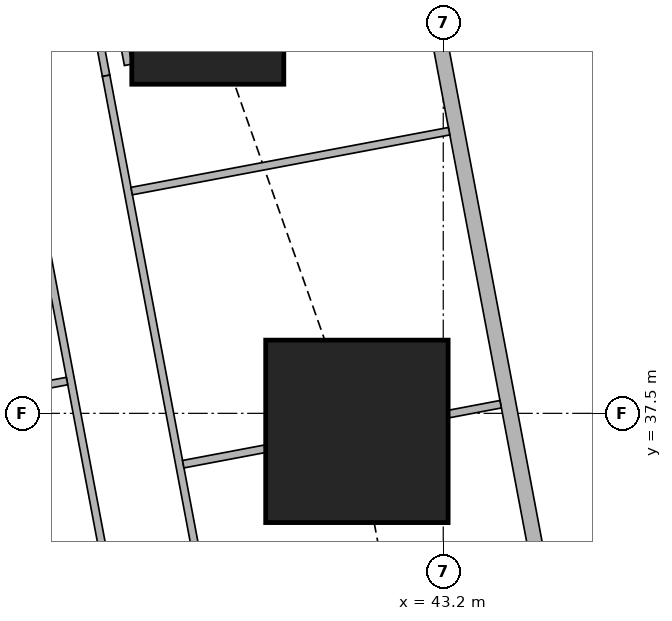
"""IFC4 building model, lengths in metres.
Left out: names, types, materials, properties, quantities, classifications, styles, units other than length and angle.
Written with IfcOpenShell. Run it as: python <this file> out.ifc"""

import sys

from ifc_helpers import new_model, si_unit, direction, frame, frame_2d, origin, origin_2d, place, context, subcontext, project, spatial, rectangle, extrude, element, fill, save


model = new_model("IFC4")
c1 = context("Model", 3, precision=1e-05, world=origin(), true_north=direction((0.0, 1.0)))
c2 = subcontext(c1, "Body", "Model", "MODEL_VIEW")
j1 = project(units=[si_unit("LENGTHUNIT", "METRE"), si_unit("PLANEANGLEUNIT", "RADIAN")], contexts=[c1])
p1 = place(None, origin())
s1 = spatial("IfcSite", under=j1, at=p1, CompositionType="ELEMENT")
p2 = place(p1, origin())
s2 = spatial("IfcBuilding", under=s1, at=p2, CompositionType="ELEMENT")
p3 = place(p2, frame((0.0, 0.0, 223.7)))
s3 = spatial("IfcBuildingStorey", under=s2, at=p3, CompositionType="ELEMENT", Elevation=223.7)
p4 = place(p3, frame((42.064, 37.263, 0.0), z_axis=(0.0, 0.0, 1.0), x_axis=(1.0, 0.0, 0.0)))
e1 = element("IfcColumn", 1, at=p4, inside=s3, PredefinedType="COLUMN", context=c2, shape_type="SweptSolid", body=[
    extrude(rectangle(XDim=2.4, YDim=2.4, at=origin_2d()), origin(), (0.0, 0.0, 1.0), 3.75),
])
p5 = place(p3, frame((40.102, 42.83, 0.0), z_axis=(0.0, 0.0, 1.0), x_axis=(1.0, 0.0, 0.0)))
e2 = element("IfcColumn", 2, at=p5, inside=s3, PredefinedType="COLUMN", context=c2, shape_type="SweptSolid", body=[
    extrude(rectangle(XDim=2.0, YDim=2.0, at=origin_2d()), origin(), (0.0, 0.0, 1.0), 3.75),
])
p6 = place(p3, frame((50.653, 2.703, 0.0), z_axis=(0.0, 0.0, 1.0), x_axis=(-0.185612026696, 0.982623109613, 0.0)))
e3 = element("IfcWall", 3, at=p6, inside=s3, PredefinedType="SOLIDWALL", context=c2, shape_type="SweptSolid", body=[
    extrude(rectangle(XDim=41.393, YDim=0.2, at=frame_2d((20.697, 0.0))), origin(), (0.0, 0.0, 1.0), 3.5),
])
p7 = place(p6, frame((1.633, 0.0, 0.9)))
e4 = element("IfcOpeningElement", 4, at=p7, cuts=e3, PredefinedType="OPENING", context=c2, shape_type="SweptSolid", body=[
    extrude(rectangle(XDim=1.8, YDim=1.5, at=frame_2d((0.9, 0.75))), frame((0.0, 0.11, 0.0), z_axis=(0.0, -1.0, 0.0), x_axis=(1.0, 0.0, 0.0)), (0.0, 0.0, 1.0), 0.22),
])
p8 = place(p6, frame((6.032, 0.0, 0.9)))
e5 = element("IfcOpeningElement", 5, at=p8, cuts=e3, PredefinedType="OPENING", context=c2, shape_type="SweptSolid", body=[
    extrude(rectangle(XDim=1.8, YDim=1.5, at=frame_2d((0.9, 0.75))), frame((0.0, 0.11, 0.0), z_axis=(0.0, -1.0, 0.0), x_axis=(1.0, 0.0, 0.0)), (0.0, 0.0, 1.0), 0.22),
])
p9 = place(p6, frame((9.848, 0.0, 0.9)))
e6 = element("IfcOpeningElement", 6, at=p9, cuts=e3, PredefinedType="OPENING", context=c2, shape_type="SweptSolid", body=[
    extrude(rectangle(XDim=1.8, YDim=1.5, at=frame_2d((0.9, 0.75))), frame((0.0, 0.11, 0.0), z_axis=(0.0, -1.0, 0.0), x_axis=(1.0, 0.0, 0.0)), (0.0, 0.0, 1.0), 0.22),
])
p10 = place(p6, frame((13.664, 0.0, 0.9)))
e7 = element("IfcOpeningElement", 7, at=p10, cuts=e3, PredefinedType="OPENING", context=c2, shape_type="SweptSolid", body=[
    extrude(rectangle(XDim=1.8, YDim=1.5, at=frame_2d((0.9, 0.75))), frame((0.0, 0.11, 0.0), z_axis=(0.0, -1.0, 0.0), x_axis=(1.0, 0.0, 0.0)), (0.0, 0.0, 1.0), 0.22),
])
p11 = place(p6, frame((17.481, 0.0, 0.9)))
e8 = element("IfcOpeningElement", 8, at=p11, cuts=e3, PredefinedType="OPENING", context=c2, shape_type="SweptSolid", body=[
    extrude(rectangle(XDim=1.8, YDim=1.5, at=frame_2d((0.9, 0.75))), frame((0.0, 0.11, 0.0), z_axis=(0.0, -1.0, 0.0), x_axis=(1.0, 0.0, 0.0)), (0.0, 0.0, 1.0), 0.22),
])
p12 = place(p6, frame((21.297, 0.0, 0.9)))
e9 = element("IfcOpeningElement", 9, at=p12, cuts=e3, PredefinedType="OPENING", context=c2, shape_type="SweptSolid", body=[
    extrude(rectangle(XDim=1.8, YDim=1.5, at=frame_2d((0.9, 0.75))), frame((0.0, 0.11, 0.0), z_axis=(0.0, -1.0, 0.0), x_axis=(1.0, 0.0, 0.0)), (0.0, 0.0, 1.0), 0.22),
])
p13 = place(p6, frame((25.113, 0.0, 0.9)))
e10 = element("IfcOpeningElement", 10, at=p13, cuts=e3, PredefinedType="OPENING", context=c2, shape_type="SweptSolid", body=[
    extrude(rectangle(XDim=1.8, YDim=1.5, at=frame_2d((0.9, 0.75))), frame((0.0, 0.11, 0.0), z_axis=(0.0, -1.0, 0.0), x_axis=(1.0, 0.0, 0.0)), (0.0, 0.0, 1.0), 0.22),
])
p14 = place(p6, frame((28.93, 0.0, 0.9)))
e11 = element("IfcOpeningElement", 11, at=p14, cuts=e3, PredefinedType="OPENING", context=c2, shape_type="SweptSolid", body=[
    extrude(rectangle(XDim=1.8, YDim=1.5, at=frame_2d((0.9, 0.75))), frame((0.0, 0.11, 0.0), z_axis=(0.0, -1.0, 0.0), x_axis=(1.0, 0.0, 0.0)), (0.0, 0.0, 1.0), 0.22),
])
p15 = place(p6, frame((32.746, 0.0, 0.9)))
e12 = element("IfcOpeningElement", 12, at=p15, cuts=e3, PredefinedType="OPENING", context=c2, shape_type="SweptSolid", body=[
    extrude(rectangle(XDim=1.8, YDim=1.5, at=frame_2d((0.9, 0.75))), frame((0.0, 0.11, 0.0), z_axis=(0.0, -1.0, 0.0), x_axis=(1.0, 0.0, 0.0)), (0.0, 0.0, 1.0), 0.22),
])
p16 = place(p6, frame((36.481, 0.0, 0.9)))
e13 = element("IfcOpeningElement", 13, at=p16, cuts=e3, PredefinedType="OPENING", context=c2, shape_type="SweptSolid", body=[
    extrude(rectangle(XDim=1.8, YDim=1.5, at=frame_2d((0.9, 0.75))), frame((0.0, 0.11, 0.0), z_axis=(0.0, -1.0, 0.0), x_axis=(1.0, 0.0, 0.0)), (0.0, 0.0, 1.0), 0.22),
])
p17 = place(p3, frame((33.68, 42.723, 0.0), z_axis=(0.0, 0.0, 1.0), x_axis=(0.185601160014, -0.982625162207, 0.0)))
e14 = element("IfcWall", 14, at=p17, inside=s3, PredefinedType="SOLIDWALL", context=c2, shape_type="SweptSolid", body=[
    extrude(rectangle(XDim=41.051, YDim=0.15, at=frame_2d((20.526, 0.0))), origin(), (0.0, 0.0, 1.0), 2.5),
])
p18 = place(p17, frame((16.123, 0.0, 0.0)))
e15 = element("IfcOpeningElement", 15, at=p18, cuts=e14, PredefinedType="OPENING", context=c2, shape_type="SweptSolid", body=[
    extrude(rectangle(XDim=1.0, YDim=2.1, at=frame_2d((0.5, 1.05))), frame((0.0, 0.085, 0.0), z_axis=(0.0, -1.0, 0.0), x_axis=(1.0, 0.0, 0.0)), (0.0, 0.0, 1.0), 0.17),
])
p19 = place(p17, frame((19.938, 0.0, 0.0)))
e16 = element("IfcOpeningElement", 16, at=p19, cuts=e14, PredefinedType="OPENING", context=c2, shape_type="SweptSolid", body=[
    extrude(rectangle(XDim=1.0, YDim=2.1, at=frame_2d((0.5, 1.05))), frame((0.0, 0.085, 0.0), z_axis=(0.0, -1.0, 0.0), x_axis=(1.0, 0.0, 0.0)), (0.0, 0.0, 1.0), 0.17),
])
p20 = place(p17, frame((30.902, 0.0, 0.0)))
e17 = element("IfcOpeningElement", 17, at=p20, cuts=e14, PredefinedType="OPENING", context=c2, shape_type="SweptSolid", body=[
    extrude(rectangle(XDim=1.0, YDim=2.1, at=frame_2d((0.5, 1.05))), frame((0.0, 0.085, 0.0), z_axis=(0.0, -1.0, 0.0), x_axis=(1.0, 0.0, 0.0)), (0.0, 0.0, 1.0), 0.17),
])
p21 = place(p3, frame((39.054, 42.085, 0.0), z_axis=(0.0, 0.0, 1.0), x_axis=(-0.185791584218, 0.982589175207, 0.0)))
e18 = element("IfcWall", 18, at=p21, inside=s3, PredefinedType="PARTITIONING", context=c2, shape_type="SweptSolid", body=[
    extrude(rectangle(XDim=3.628, YDim=0.1, at=frame_2d((1.814, 0.0))), origin(), (0.0, 0.0, 1.0), 2.05),
])
p22 = place(p3, frame((38.256, 44.628, 0.0), z_axis=(0.0, 0.0, 1.0), x_axis=(0.185700639943, -0.982606366927, 0.0)))
e19 = element("IfcWall", 19, at=p22, inside=s3, PredefinedType="PARTITIONING", context=c2, shape_type="SweptSolid", body=[
    extrude(rectangle(XDim=2.735, YDim=0.1, at=frame_2d((1.367, 0.0))), origin(), (0.0, 0.0, 1.0), 2.05),
])
p23 = place(p3, frame((38.764, 41.941, 0.0), z_axis=(0.0, 0.0, 1.0), x_axis=(0.185512176227, -0.982641965556, 0.0)))
e20 = element("IfcWall", 20, at=p23, inside=s3, PredefinedType="PARTITIONING", context=c2, shape_type="SweptSolid", body=[
    extrude(rectangle(XDim=12.792, YDim=0.1, at=frame_2d((6.396, 0.0))), origin(), (0.0, 0.0, 1.0), 2.5),
])
p24 = place(p23, frame((11.35, 0.0, 0.0)))
e21 = element("IfcOpeningElement", 21, at=p24, cuts=e20, PredefinedType="OPENING", context=c2, shape_type="SweptSolid", body=[
    extrude(rectangle(XDim=0.9, YDim=2.1, at=frame_2d((0.45, 1.05))), frame((0.0, 0.06, 0.0), z_axis=(0.0, -1.0, 0.0), x_axis=(1.0, 0.0, 0.0)), (0.0, 0.0, 1.0), 0.12),
])
p25 = place(p23, frame((8.085, 0.0, 0.0)))
e22 = element("IfcOpeningElement", 22, at=p25, cuts=e20, PredefinedType="OPENING", context=c2, shape_type="SweptSolid", body=[
    extrude(rectangle(XDim=0.9, YDim=2.1, at=frame_2d((0.45, 1.05))), frame((0.0, 0.06, 0.0), z_axis=(0.0, -1.0, 0.0), x_axis=(1.0, 0.0, 0.0)), (0.0, 0.0, 1.0), 0.12),
])
p26 = place(p23, frame((3.7, 0.0, 0.0)))
e23 = element("IfcOpeningElement", 23, at=p26, cuts=e20, PredefinedType="OPENING", context=c2, shape_type="SweptSolid", body=[
    extrude(rectangle(XDim=0.9, YDim=2.1, at=frame_2d((0.45, 1.05))), frame((0.0, 0.06, 0.0), z_axis=(0.0, -1.0, 0.0), x_axis=(1.0, 0.0, 0.0)), (0.0, 0.0, 1.0), 0.12),
])
p27 = place(p3, frame((37.473, 42.309, 0.0), z_axis=(0.0, 0.0, 1.0), x_axis=(0.185570636839, -0.982630927024, 0.0)))
e24 = element("IfcWall", 24, at=p27, inside=s3, PredefinedType="PARTITIONING", context=c2, shape_type="SweptSolid", body=[
    extrude(rectangle(XDim=13.553, YDim=0.1, at=frame_2d((6.777, 0.0))), origin(), (0.0, 0.0, 1.0), 2.5),
])
p28 = place(p27, frame((12.128, 0.0, 0.0)))
e25 = element("IfcOpeningElement", 25, at=p28, cuts=e24, PredefinedType="OPENING", context=c2, shape_type="SweptSolid", body=[
    extrude(rectangle(XDim=0.9, YDim=2.1, at=frame_2d((0.45, 1.05))), frame((0.0, 0.06, 0.0), z_axis=(0.0, -1.0, 0.0), x_axis=(1.0, 0.0, 0.0)), (0.0, 0.0, 1.0), 0.12),
])
p29 = place(p27, frame((8.487, 0.0, 0.0)))
e26 = element("IfcOpeningElement", 26, at=p29, cuts=e24, PredefinedType="OPENING", context=c2, shape_type="SweptSolid", body=[
    extrude(rectangle(XDim=0.9, YDim=2.1, at=frame_2d((0.45, 1.05))), frame((0.0, 0.06, 0.0), z_axis=(0.0, -1.0, 0.0), x_axis=(1.0, 0.0, 0.0)), (0.0, 0.0, 1.0), 0.12),
])
p30 = place(p27, frame((2.853, 0.0, 0.0)))
e27 = element("IfcOpeningElement", 27, at=p30, cuts=e24, PredefinedType="OPENING", context=c2, shape_type="SweptSolid", body=[
    extrude(rectangle(XDim=0.9, YDim=2.1, at=frame_2d((0.45, 1.05))), frame((0.0, 0.06, 0.0), z_axis=(0.0, -1.0, 0.0), x_axis=(1.0, 0.0, 0.0)), (0.0, 0.0, 1.0), 0.12),
])
p31 = place(p27, frame((10.22, 0.0, 0.0)))
e28 = element("IfcOpeningElement", 28, at=p31, cuts=e24, PredefinedType="OPENING", context=c2, shape_type="SweptSolid", body=[
    extrude(rectangle(XDim=0.9, YDim=2.1, at=frame_2d((0.45, 1.05))), frame((0.0, 0.06, 0.0), z_axis=(0.0, -1.0, 0.0), x_axis=(1.0, 0.0, 0.0)), (0.0, 0.0, 1.0), 0.12),
])
p32 = place(p27, frame((5.819, 0.0, 0.0)))
e29 = element("IfcOpeningElement", 29, at=p32, cuts=e24, PredefinedType="OPENING", context=c2, shape_type="SweptSolid", body=[
    extrude(rectangle(XDim=0.9, YDim=2.1, at=frame_2d((0.45, 1.05))), frame((0.0, 0.06, 0.0), z_axis=(0.0, -1.0, 0.0), x_axis=(1.0, 0.0, 0.0)), (0.0, 0.0, 1.0), 0.12),
])
p33 = place(p3, frame((43.277, 41.212, 0.0), z_axis=(0.0, 0.0, 1.0), x_axis=(-0.982665405803, -0.185387972203, 0.0)))
e30 = element("IfcWall", 30, at=p33, inside=s3, PredefinedType="PARTITIONING", context=c2, shape_type="SweptSolid", body=[
    extrude(rectangle(XDim=4.25, YDim=0.1, at=frame_2d((2.125, 0.0))), origin(), (0.0, 0.0, 1.0), 2.05),
])
p34 = place(p3, frame((43.955, 37.62, 0.0), z_axis=(0.0, 0.0, 1.0), x_axis=(-0.982495415327, -0.186286765128, 0.0)))
e31 = element("IfcWall", 31, at=p34, inside=s3, PredefinedType="PARTITIONING", context=c2, shape_type="SweptSolid", body=[
    extrude(rectangle(XDim=0.693, YDim=0.1, at=frame_2d((0.347, 0.0))), origin(), (0.0, 0.0, 1.0), 3.5),
])
p35 = place(p3, frame((40.854, 37.034, 0.0), z_axis=(0.0, 0.0, 1.0), x_axis=(-0.982651678759, -0.185460718839, 0.0)))
e32 = element("IfcWall", 32, at=p35, inside=s3, PredefinedType="PARTITIONING", context=c2, shape_type="SweptSolid", body=[
    extrude(rectangle(XDim=1.094, YDim=0.1, at=frame_2d((0.547, 0.0))), origin(), (0.0, 0.0, 1.0), 3.5),
])
p36 = place(p3, frame((38.25, 37.925, 0.0), z_axis=(0.0, 0.0, 1.0), x_axis=(-0.982610209589, -0.185680305934, 0.0)))
e33 = element("IfcWall", 33, at=p36, inside=s3, PredefinedType="PARTITIONING", context=c2, shape_type="SweptSolid", body=[
    extrude(rectangle(XDim=1.567, YDim=0.1, at=frame_2d((0.784, 0.0))), origin(), (0.0, 0.0, 1.0), 3.5),
])
p37 = place(p15, origin())
e34 = element("IfcWindow", 34, at=p37, inside=s3, PartitioningType="SINGLE_PANEL", PredefinedType="WINDOW", context=c2, shape_type="SweptSolid", body=[
    extrude(rectangle(XDim=1.8, YDim=1.5, at=frame_2d((0.9, 0.75))), frame((0.0, 0.03, 0.0), z_axis=(0.0, -1.0, 0.0), x_axis=(1.0, 0.0, 0.0)), (0.0, 0.0, 1.0), 0.06),
])
fill(e12, e34)
p38 = place(p16, origin())
e35 = element("IfcWindow", 35, at=p38, inside=s3, PartitioningType="SINGLE_PANEL", PredefinedType="WINDOW", context=c2, shape_type="SweptSolid", body=[
    extrude(rectangle(XDim=1.8, YDim=1.5, at=frame_2d((0.9, 0.75))), frame((0.0, 0.03, 0.0), z_axis=(0.0, -1.0, 0.0), x_axis=(1.0, 0.0, 0.0)), (0.0, 0.0, 1.0), 0.06),
])
fill(e13, e35)
p39 = place(p26, origin())
e36 = element("IfcDoor", 36, at=p39, inside=s3, OperationType="SINGLE_SWING_RIGHT", PredefinedType="DOOR", context=c2, shape_type="SweptSolid", body=[
    extrude(rectangle(XDim=0.9, YDim=2.1, at=frame_2d((0.45, 1.05))), frame((0.0, 0.025, 0.0), z_axis=(0.0, -1.0, 0.0), x_axis=(1.0, 0.0, 0.0)), (0.0, 0.0, 1.0), 0.05),
])
fill(e23, e36)
p40 = place(p30, origin())
e37 = element("IfcDoor", 37, at=p40, inside=s3, OperationType="SINGLE_SWING_LEFT", PredefinedType="DOOR", context=c2, shape_type="SweptSolid", body=[
    extrude(rectangle(XDim=0.9, YDim=2.1, at=frame_2d((0.45, 1.05))), frame((0.0, 0.025, 0.0), z_axis=(0.0, -1.0, 0.0), x_axis=(1.0, 0.0, 0.0)), (0.0, 0.0, 1.0), 0.05),
])
fill(e27, e37)
p41 = place(p32, origin())
e38 = element("IfcDoor", 38, at=p41, inside=s3, OperationType="SINGLE_SWING_RIGHT", PredefinedType="DOOR", context=c2, shape_type="SweptSolid", body=[
    extrude(rectangle(XDim=0.9, YDim=2.1, at=frame_2d((0.45, 1.05))), frame((0.0, 0.025, 0.0), z_axis=(0.0, -1.0, 0.0), x_axis=(1.0, 0.0, 0.0)), (0.0, 0.0, 1.0), 0.05),
])
fill(e29, e38)
save(model, sys.argv[1])
